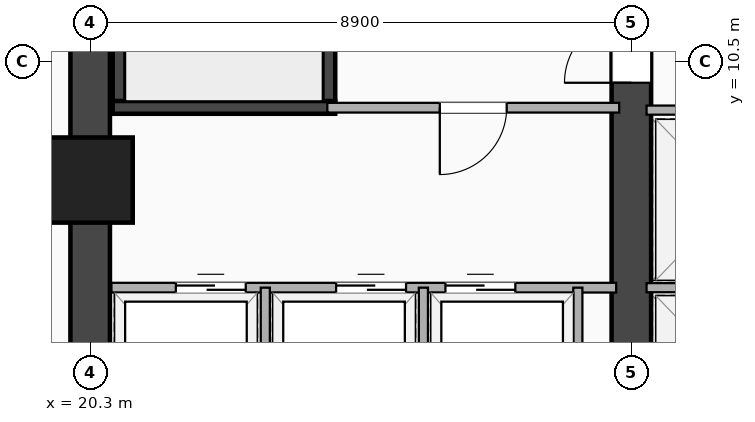
"""IFC4 building model, lengths in metres.
Left out: names, types, materials, properties, quantities, classifications, styles, units other than length and angle.
Written with IfcOpenShell. Run it as: python <this file> out.ifc"""

import sys

from ifc_helpers import new_model, si_unit, direction, frame, frame_2d, origin, origin_2d, place, context, subcontext, project, spatial, rectangle, extrude, element, fill, save


model = new_model("IFC4")
c1 = context("Model", 3, precision=1e-05, world=origin(), true_north=direction((0.0, 1.0)))
c2 = subcontext(c1, "Body", "Model", "MODEL_VIEW")
j1 = project(units=[si_unit("LENGTHUNIT", "METRE"), si_unit("PLANEANGLEUNIT", "RADIAN")], contexts=[c1])
p1 = place(None, origin())
s1 = spatial("IfcSite", under=j1, at=p1, CompositionType="ELEMENT")
p2 = place(p1, origin())
s2 = spatial("IfcBuilding", under=s1, at=p2, CompositionType="ELEMENT")
p3 = place(p2, frame((0.0, 0.0, 68.4)))
s3 = spatial("IfcBuildingStorey", under=s2, at=p3, CompositionType="ELEMENT", Elevation=68.4)
p4 = place(p3, frame((20.3, 3.5, 0.0), z_axis=(0.0, 0.0, 1.0), x_axis=(0.0, 1.0, 0.0)))
e1 = element("IfcWall", 1, at=p4, inside=s3, PredefinedType="SHEAR", context=c2, shape_type="SweptSolid", body=[
    extrude(rectangle(XDim=16.9, YDim=0.65, at=frame_2d((8.45, 0.0))), origin(), (0.0, 0.0, 1.0), 3.22),
])
p5 = place(p3, frame((29.2, 3.5, 0.0), z_axis=(0.0, 0.0, 1.0), x_axis=(0.0, 1.0, 0.0)))
e2 = element("IfcWall", 2, at=p5, inside=s3, PredefinedType="SHEAR", context=c2, shape_type="SweptSolid", body=[
    extrude(rectangle(XDim=16.9, YDim=0.65, at=frame_2d((8.45, 0.0))), origin(), (0.0, 0.0, 1.0), 3.22),
])
p6 = place(p5, frame((7.75, 0.0, 0.0), z_axis=(0.0, 0.0, 1.0), x_axis=(-1.0, 0.0, 0.0)))
e3 = element("IfcOpeningElement", 3, at=p6, cuts=e2, PredefinedType="OPENING", context=c2, shape_type="SweptSolid", body=[
    extrude(rectangle(XDim=1.1, YDim=2.15, at=frame_2d((0.55, 1.075))), frame((0.0, 0.335, 0.0), z_axis=(0.0, -1.0, 0.0), x_axis=(1.0, 0.0, 0.0)), (0.0, 0.0, 1.0), 0.67),
])
for number, where, z_axis, x_axis in (
    (4, (20.775, 9.745, 0.0), (0.0, 0.0, 1.0), (0.0, 1.0, 0.0)),
    (5, (24.225, 9.745, 0.0), (0.0, 0.0, 1.0), (0.0, 1.0, 0.0)),
):
    element("IfcWall", number, at=place(p3, frame(where, z_axis=z_axis, x_axis=x_axis)), inside=s3, PredefinedType="SHEAR", context=c2, shape_type="SweptSolid", body=[
        extrude(rectangle(XDim=8.01, YDim=0.21, at=frame_2d((4.005, 0.0))), origin(), (0.0, 0.0, 1.0), 3.22),
    ])
p7 = place(p3, frame((20.67, 9.745, 0.0), z_axis=(0.0, 0.0, 1.0), x_axis=(1.0, 0.0, 0.0)))
e6 = element("IfcWall", 6, at=p7, inside=s3, PredefinedType="SHEAR", context=c2, shape_type="SweptSolid", body=[
    extrude(rectangle(XDim=3.66, YDim=0.21, at=frame_2d((1.83, 0.0))), origin(), (0.0, 0.0, 1.0), 3.22),
])
p8 = place(p3, frame((20.3, 8.55, -0.28), z_axis=(0.0, 0.0, 1.0), x_axis=(1.0, 0.0, 0.0)))
e7 = element("IfcColumn", 7, at=p8, inside=s3, PredefinedType="COLUMN", context=c2, shape_type="SweptSolid", body=[
    extrude(rectangle(XDim=1.4, YDim=1.4, at=origin_2d()), origin(), (0.0, 0.0, 1.0), 3.5),
])
p9 = place(p3, frame((20.65, 6.78, 0.0), z_axis=(0.0, 0.0, 1.0), x_axis=(1.0, 0.0, 0.0)))
e8 = element("IfcWall", 8, at=p9, inside=s3, PredefinedType="PARTITIONING", context=c2, shape_type="SweptSolid", body=[
    extrude(rectangle(XDim=8.3, YDim=0.16, at=frame_2d((4.15, 0.0))), origin(), (0.0, 0.0, 1.0), 2.51),
])
p10 = place(p9, frame((3.695, 0.0, 0.0)))
e9 = element("IfcOpeningElement", 9, at=p10, cuts=e8, PredefinedType="OPENING", context=c2, shape_type="SweptSolid", body=[
    extrude(rectangle(XDim=1.15, YDim=2.2, at=frame_2d((0.575, 1.1))), frame((0.0, 0.09, 0.0), z_axis=(0.0, -1.0, 0.0), x_axis=(1.0, 0.0, 0.0)), (0.0, 0.0, 1.0), 0.18),
])
p11 = place(p9, frame((5.492, 0.0, 0.0)))
e10 = element("IfcOpeningElement", 10, at=p11, cuts=e8, PredefinedType="OPENING", context=c2, shape_type="SweptSolid", body=[
    extrude(rectangle(XDim=1.15, YDim=2.2, at=frame_2d((0.575, 1.1))), frame((0.0, 0.09, 0.0), z_axis=(0.0, -1.0, 0.0), x_axis=(1.0, 0.0, 0.0)), (0.0, 0.0, 1.0), 0.18),
])
p12 = place(p9, frame((1.059, 0.0, 0.0)))
e11 = element("IfcOpeningElement", 11, at=p12, cuts=e8, PredefinedType="OPENING", context=c2, shape_type="SweptSolid", body=[
    extrude(rectangle(XDim=1.15, YDim=2.2, at=frame_2d((0.575, 1.1))), frame((0.0, 0.09, 0.0), z_axis=(0.0, -1.0, 0.0), x_axis=(1.0, 0.0, 0.0)), (0.0, 0.0, 1.0), 0.18),
])
for number, where, z_axis, x_axis in (
    (12, (23.18, 3.9, 0.0), (0.0, 0.0, 1.0), (0.0, 1.0, 0.0)),
    (13, (25.78, 3.9, 0.0), (0.0, 0.0, 1.0), (0.0, 1.0, 0.0)),
    (14, (28.32, 3.9, 0.0), (0.0, 0.0, 1.0), (0.0, 1.0, 0.0)),
):
    element("IfcWall", number, at=place(p3, frame(where, z_axis=z_axis, x_axis=x_axis)), inside=s3, PredefinedType="PARTITIONING", context=c2, shape_type="SweptSolid", body=[
        extrude(rectangle(XDim=2.88, YDim=0.15, at=frame_2d((1.44, 0.0))), origin(), (0.0, 0.0, 1.0), 3.22),
    ])
p13 = place(p3, frame((24.2, 9.74, 0.0), z_axis=(0.0, 0.0, 1.0), x_axis=(1.0, 0.0, 0.0)))
e15 = element("IfcWall", 15, at=p13, inside=s3, PredefinedType="PARTITIONING", context=c2, shape_type="SweptSolid", body=[
    extrude(rectangle(XDim=4.8, YDim=0.16, at=frame_2d((2.4, 0.0))), origin(), (0.0, 0.0, 1.0), 3.22),
])
p14 = place(p13, frame((1.85, 0.0, 0.0)))
e16 = element("IfcOpeningElement", 16, at=p14, cuts=e15, PredefinedType="OPENING", context=c2, shape_type="SweptSolid", body=[
    extrude(rectangle(XDim=1.1, YDim=2.15, at=frame_2d((0.55, 1.075))), frame((0.0, 0.09, 0.0), z_axis=(0.0, -1.0, 0.0), x_axis=(1.0, 0.0, 0.0)), (0.0, 0.0, 1.0), 0.18),
])
for number, where, z_axis, x_axis in (
    (17, (29.45, 6.78, 0.0), (0.0, 0.0, 1.0), (1.0, 0.0, 0.0)),
    (18, (29.45, 9.7, 0.0), (0.0, 0.0, 1.0), (1.0, 0.0, 0.0)),
):
    element("IfcWall", number, at=place(p3, frame(where, z_axis=z_axis, x_axis=x_axis)), inside=s3, PredefinedType="PARTITIONING", context=c2, shape_type="SweptSolid", body=[
        extrude(rectangle(XDim=2.77, YDim=0.15, at=frame_2d((1.385, 0.0))), origin(), (0.0, 0.0, 1.0), 3.22),
    ])
p15 = place(p6, origin())
e19 = element("IfcDoor", 19, at=p15, inside=s3, OperationType="SINGLE_SWING_LEFT", PredefinedType="DOOR", context=c2, shape_type="SweptSolid", body=[
    extrude(rectangle(XDim=1.1, YDim=2.15, at=frame_2d((0.55, 1.075))), frame((0.0, 0.025, 0.0), z_axis=(0.0, -1.0, 0.0), x_axis=(1.0, 0.0, 0.0)), (0.0, 0.0, 1.0), 0.05),
])
fill(e3, e19)
p16 = place(p10, origin())
e20 = element("IfcDoor", 20, at=p16, inside=s3, OperationType="DOUBLE_DOOR_SLIDING", PredefinedType="DOOR", context=c2, shape_type="SweptSolid", body=[
    extrude(rectangle(XDim=1.15, YDim=2.2, at=frame_2d((0.575, 1.1))), frame((0.0, 0.025, 0.0), z_axis=(0.0, -1.0, 0.0), x_axis=(1.0, 0.0, 0.0)), (0.0, 0.0, 1.0), 0.05),
])
fill(e9, e20)
p17 = place(p11, origin())
e21 = element("IfcDoor", 21, at=p17, inside=s3, OperationType="DOUBLE_DOOR_SLIDING", PredefinedType="DOOR", context=c2, shape_type="SweptSolid", body=[
    extrude(rectangle(XDim=1.15, YDim=2.2, at=frame_2d((0.575, 1.1))), frame((0.0, 0.025, 0.0), z_axis=(0.0, -1.0, 0.0), x_axis=(1.0, 0.0, 0.0)), (0.0, 0.0, 1.0), 0.05),
])
fill(e10, e21)
p18 = place(p12, origin())
e22 = element("IfcDoor", 22, at=p18, inside=s3, OperationType="DOUBLE_DOOR_SLIDING", PredefinedType="DOOR", context=c2, shape_type="SweptSolid", body=[
    extrude(rectangle(XDim=1.15, YDim=2.2, at=frame_2d((0.575, 1.1))), frame((0.0, 0.025, 0.0), z_axis=(0.0, -1.0, 0.0), x_axis=(1.0, 0.0, 0.0)), (0.0, 0.0, 1.0), 0.05),
])
fill(e11, e22)
p19 = place(p14, origin())
e23 = element("IfcDoor", 23, at=p19, inside=s3, OperationType="SINGLE_SWING_LEFT", PredefinedType="DOOR", context=c2, shape_type="SweptSolid", body=[
    extrude(rectangle(XDim=1.1, YDim=2.15, at=frame_2d((0.55, 1.075))), frame((0.0, 0.025, 0.0), z_axis=(0.0, -1.0, 0.0), x_axis=(1.0, 0.0, 0.0)), (0.0, 0.0, 1.0), 0.05),
])
fill(e16, e23)
save(model, sys.argv[1])
